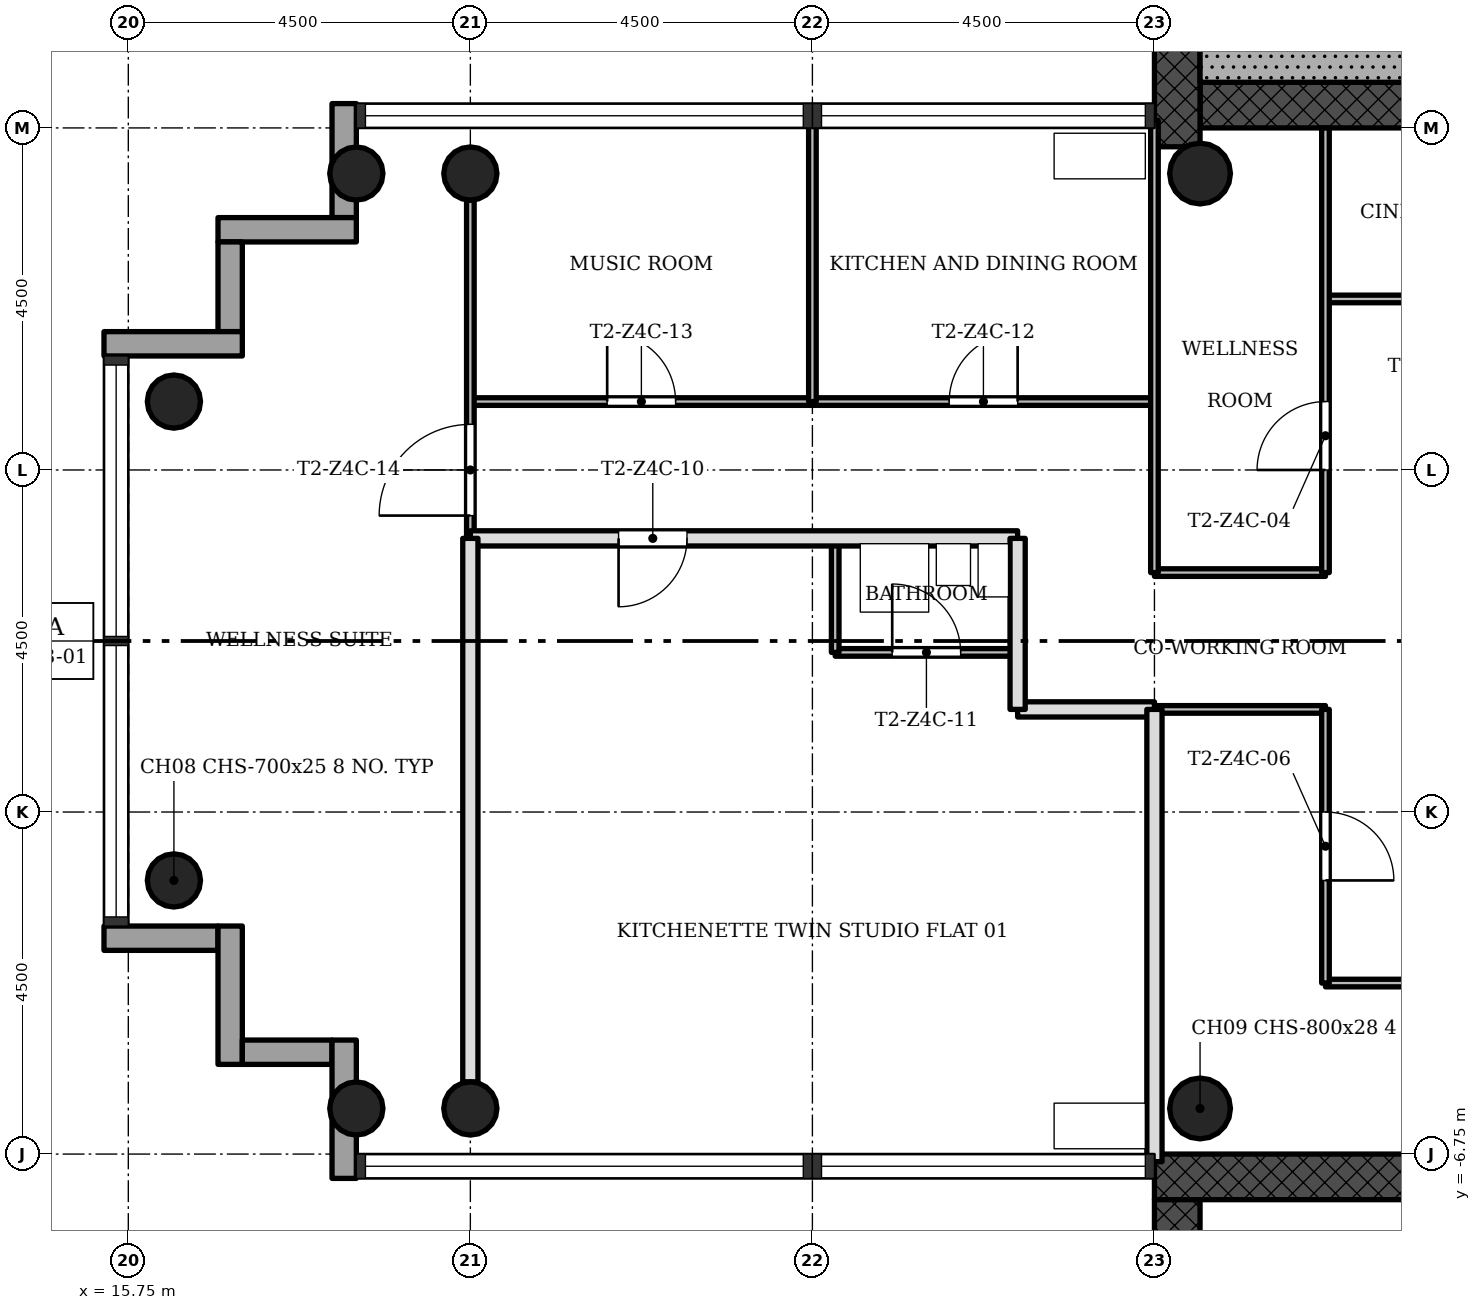
"""IFC4 building model, lengths in metres.
Left out: names, types, materials, properties, quantities, classifications, styles, units other than length and angle.
Written with IfcOpenShell. Run it as: python <this file> out.ifc"""

import sys

from ifc_helpers import new_model, si_unit, direction, frame, frame_2d, origin, origin_2d, place, context, subcontext, project, spatial, rectangle, hollow_circle, extrude, element, fill, save


model = new_model("IFC4")
c1 = context("Model", 3, precision=1e-05, world=origin(), true_north=direction((0.0, 1.0)))
c2 = subcontext(c1, "Body", "Model", "MODEL_VIEW")
j1 = project(units=[si_unit("LENGTHUNIT", "METRE"), si_unit("PLANEANGLEUNIT", "RADIAN")], contexts=[c1])
p1 = place(None, origin())
s1 = spatial("IfcSite", under=j1, at=p1, CompositionType="ELEMENT")
p2 = place(p1, origin())
s2 = spatial("IfcBuilding", under=s1, at=p2, CompositionType="ELEMENT")
p3 = place(p2, frame((0.0, 0.0, 192.6)))
s3 = spatial("IfcBuildingStorey", under=s2, at=p3, CompositionType="ELEMENT", Elevation=192.6)
p4 = place(p3, frame((29.85, 7.05, 0.0), z_axis=(0.0, 0.0, 1.0), x_axis=(1.0, 0.0, 0.0)))
e1 = element("IfcWall", 1, at=p4, inside=s3, PredefinedType="SHEAR", context=c2, shape_type="SweptSolid", body=[
    extrude(rectangle(XDim=12.9, YDim=0.6, at=frame_2d((6.45, 0.0))), origin(), (0.0, 0.0, 1.0), 3.4),
])
p5 = place(p4, frame((5.25, 0.0, 0.0)))
e2 = element("IfcOpeningElement", 2, at=p5, cuts=e1, PredefinedType="OPENING", context=c2, shape_type="SweptSolid", body=[
    extrude(rectangle(XDim=1.8, YDim=2.1, at=frame_2d((0.9, 1.05))), frame((0.0, 0.31, 0.0), z_axis=(0.0, -1.0, 0.0), x_axis=(1.0, 0.0, 0.0)), (0.0, 0.0, 1.0), 0.62),
])
p6 = place(p3, frame((29.55, 15.15, 0.0), z_axis=(0.0, 0.0, 1.0), x_axis=(0.0, -1.0, 0.0)))
e3 = element("IfcWall", 3, at=p6, inside=s3, PredefinedType="SHEAR", context=c2, shape_type="SweptSolid", body=[
    extrude(rectangle(XDim=8.648, YDim=0.6, at=frame_2d((4.324, 0.0))), origin(), (0.0, 0.0, 1.0), 3.4),
])
p7 = place(p3, frame((42.15, -7.05, 0.0), z_axis=(0.0, 0.0, 1.0), x_axis=(-1.0, 0.0, 0.0)))
e4 = element("IfcWall", 4, at=p7, inside=s3, PredefinedType="SHEAR", context=c2, shape_type="SweptSolid", body=[
    extrude(rectangle(XDim=12.9, YDim=0.6, at=frame_2d((6.45, 0.0))), origin(), (0.0, 0.0, 1.0), 3.4),
])
p8 = place(p7, frame((5.25, 0.0, 0.0)))
e5 = element("IfcOpeningElement", 5, at=p8, cuts=e4, PredefinedType="OPENING", context=c2, shape_type="SweptSolid", body=[
    extrude(rectangle(XDim=1.8, YDim=2.1, at=frame_2d((0.9, 1.05))), frame((0.0, 0.31, 0.0), z_axis=(0.0, -1.0, 0.0), x_axis=(1.0, 0.0, 0.0)), (0.0, 0.0, 1.0), 0.62),
])
p9 = place(p3, frame((29.55, -7.35, 0.0), z_axis=(0.0, 0.0, 1.0), x_axis=(0.0, -1.0, 0.0)))
e6 = element("IfcWall", 6, at=p9, inside=s3, PredefinedType="SHEAR", context=c2, shape_type="SweptSolid", body=[
    extrude(rectangle(XDim=8.4, YDim=0.6, at=frame_2d((4.2, 0.0))), origin(), (0.0, 0.0, 1.0), 3.4),
])
for number, where, z_axis, x_axis in (
    (7, (20.25, 6.15, 0.0), (0.0, 0.0, 1.0), (1.0, 0.0, 0.0)),
    (8, (20.25, -6.15, 0.0), (0.0, 0.0, 1.0), (1.0, 0.0, 0.0)),
    (9, (18.75, 6.15, 0.0), (0.0, 0.0, 1.0), (1.0, 0.0, 0.0)),
    (10, (18.75, -6.15, 0.0), (0.0, 0.0, 1.0), (1.0, 0.0, 0.0)),
    (11, (16.35, 3.15, 0.0), (0.0, 0.0, 1.0), (1.0, 0.0, 0.0)),
    (12, (16.35, -3.15, 0.0), (0.0, 0.0, 1.0), (1.0, 0.0, 0.0)),
):
    element("IfcColumn", number, at=place(p3, frame(where, z_axis=z_axis, x_axis=x_axis)), inside=s3, PredefinedType="COLUMN", context=c2, shape_type="SweptSolid", body=[
        extrude(hollow_circle(Radius=0.35, WallThickness=0.025, at=origin_2d()), origin(), (0.0, 0.0, 1.0), 3.4),
    ])
for number, where, z_axis, x_axis in (
    (13, (29.85, 6.15, 0.0), (0.0, 0.0, 1.0), (1.0, 0.0, 0.0)),
    (14, (29.85, -6.15, 0.0), (0.0, 0.0, 1.0), (1.0, 0.0, 0.0)),
):
    element("IfcColumn", number, at=place(p3, frame(where, z_axis=z_axis, x_axis=x_axis)), inside=s3, PredefinedType="COLUMN", context=c2, shape_type="SweptSolid", body=[
        extrude(hollow_circle(Radius=0.4, WallThickness=0.028, at=origin_2d()), origin(), (0.0, 0.0, 1.0), 3.4),
    ])
p10 = place(p3, frame((18.59, 7.07, -0.3), z_axis=(0.0, 0.0, 1.0), x_axis=(0.0, -1.0, 0.0)))
e15 = element("IfcWall", 15, at=p10, inside=s3, PredefinedType="STANDARD", context=c2, shape_type="SweptSolid", body=[
    extrude(rectangle(XDim=1.5, YDim=0.32, at=frame_2d((0.75, 0.0))), origin(), (0.0, 0.0, 1.0), 3.4),
])
p11 = place(p3, frame((18.75, 5.41, -0.3), z_axis=(0.0, 0.0, 1.0), x_axis=(-1.0, 0.0, 0.0)))
e16 = element("IfcWall", 16, at=p11, inside=s3, PredefinedType="STANDARD", context=c2, shape_type="SweptSolid", body=[
    extrude(rectangle(XDim=1.82, YDim=0.32, at=frame_2d((0.91, 0.0))), origin(), (0.0, 0.0, 1.0), 3.4),
])
p12 = place(p3, frame((17.09, 5.25, -0.3), z_axis=(0.0, 0.0, 1.0), x_axis=(0.0, -1.0, 0.0)))
e17 = element("IfcWall", 17, at=p12, inside=s3, PredefinedType="STANDARD", context=c2, shape_type="SweptSolid", body=[
    extrude(rectangle(XDim=1.18, YDim=0.32, at=frame_2d((0.59, 0.0))), origin(), (0.0, 0.0, 1.0), 3.4),
])
p13 = place(p3, frame((17.25, 3.91, -0.3), z_axis=(0.0, 0.0, 1.0), x_axis=(-1.0, 0.0, 0.0)))
e18 = element("IfcWall", 18, at=p13, inside=s3, PredefinedType="STANDARD", context=c2, shape_type="SweptSolid", body=[
    extrude(rectangle(XDim=1.82, YDim=0.32, at=frame_2d((0.91, 0.0))), origin(), (0.0, 0.0, 1.0), 3.4),
])
p14 = place(p3, frame((15.43, -3.91, -0.3), z_axis=(0.0, 0.0, 1.0), x_axis=(1.0, 0.0, 0.0)))
e19 = element("IfcWall", 19, at=p14, inside=s3, PredefinedType="STANDARD", context=c2, shape_type="SweptSolid", body=[
    extrude(rectangle(XDim=1.5, YDim=0.32, at=frame_2d((0.75, 0.0))), origin(), (0.0, 0.0, 1.0), 3.4),
])
p15 = place(p3, frame((17.09, -3.75, -0.3), z_axis=(0.0, 0.0, 1.0), x_axis=(0.0, -1.0, 0.0)))
e20 = element("IfcWall", 20, at=p15, inside=s3, PredefinedType="STANDARD", context=c2, shape_type="SweptSolid", body=[
    extrude(rectangle(XDim=1.82, YDim=0.32, at=frame_2d((0.91, 0.0))), origin(), (0.0, 0.0, 1.0), 3.4),
])
p16 = place(p3, frame((17.25, -5.41, -0.3), z_axis=(0.0, 0.0, 1.0), x_axis=(1.0, 0.0, 0.0)))
e21 = element("IfcWall", 21, at=p16, inside=s3, PredefinedType="STANDARD", context=c2, shape_type="SweptSolid", body=[
    extrude(rectangle(XDim=1.18, YDim=0.32, at=frame_2d((0.59, 0.0))), origin(), (0.0, 0.0, 1.0), 3.4),
])
p17 = place(p3, frame((18.59, -5.25, -0.3), z_axis=(0.0, 0.0, 1.0), x_axis=(0.0, -1.0, 0.0)))
e22 = element("IfcWall", 22, at=p17, inside=s3, PredefinedType="STANDARD", context=c2, shape_type="SweptSolid", body=[
    extrude(rectangle(XDim=1.82, YDim=0.32, at=frame_2d((0.91, 0.0))), origin(), (0.0, 0.0, 1.0), 3.4),
])
p18 = place(p3, frame((34.5, -4.5, 0.0), z_axis=(0.0, 0.0, 1.0), x_axis=(-1.0, 0.0, 0.0)))
e23 = element("IfcWall", 23, at=p18, inside=s3, PredefinedType="PARTITIONING", context=c2, shape_type="SweptSolid", body=[
    extrude(rectangle(XDim=3.0, YDim=0.1, at=frame_2d((1.5, 0.0))), origin(), (0.0, 0.0, 1.0), 3.0),
])
p19 = place(p3, frame((31.5, -0.9, 0.0), z_axis=(0.0, 0.0, 1.0), x_axis=(-1.0, 0.0, 0.0)))
e24 = element("IfcWall", 24, at=p19, inside=s3, PredefinedType="PARTITIONING", context=c2, shape_type="SweptSolid", body=[
    extrude(rectangle(XDim=2.25, YDim=0.1, at=frame_2d((1.125, 0.0))), origin(), (0.0, 0.0, 1.0), 3.0),
])
p20 = place(p3, frame((29.25, -0.9, 0.0), z_axis=(0.0, 0.0, 1.0), x_axis=(-1.0, 0.0, 0.0)))
e25 = element("IfcWall", 25, at=p20, inside=s3, PredefinedType="SOLIDWALL", context=c2, shape_type="SweptSolid", body=[
    extrude(rectangle(XDim=1.8, YDim=0.2, at=frame_2d((0.9, 0.0))), origin(), (0.0, 0.0, 1.0), 3.0),
])
p21 = place(p3, frame((27.45, -0.15, 0.0), z_axis=(0.0, 0.0, 1.0), x_axis=(-1.0, 0.0, 0.0)))
e26 = element("IfcWall", 26, at=p21, inside=s3, PredefinedType="PARTITIONING", context=c2, shape_type="SweptSolid", body=[
    extrude(rectangle(XDim=2.4, YDim=0.1, at=frame_2d((1.2, 0.0))), origin(), (0.0, 0.0, 1.0), 3.0),
])
p22 = place(p21, frame((0.75, 0.0, 0.0)))
e27 = element("IfcOpeningElement", 27, at=p22, cuts=e26, PredefinedType="OPENING", context=c2, shape_type="SweptSolid", body=[
    extrude(rectangle(XDim=0.9, YDim=2.1, at=frame_2d((0.45, 1.05))), frame((0.0, 0.06, 0.0), z_axis=(0.0, -1.0, 0.0), x_axis=(1.0, 0.0, 0.0)), (0.0, 0.0, 1.0), 0.12),
])
p23 = place(p3, frame((31.5, 0.9, 0.0), z_axis=(0.0, 0.0, 1.0), x_axis=(-1.0, 0.0, 0.0)))
e28 = element("IfcWall", 28, at=p23, inside=s3, PredefinedType="PARTITIONING", context=c2, shape_type="SweptSolid", body=[
    extrude(rectangle(XDim=2.25, YDim=0.1, at=frame_2d((1.125, 0.0))), origin(), (0.0, 0.0, 1.0), 3.0),
])
p24 = place(p3, frame((27.45, 1.35, 0.0), z_axis=(0.0, 0.0, 1.0), x_axis=(-1.0, 0.0, 0.0)))
e29 = element("IfcWall", 29, at=p24, inside=s3, PredefinedType="SOLIDWALL", context=c2, shape_type="SweptSolid", body=[
    extrude(rectangle(XDim=7.2, YDim=0.2, at=frame_2d((3.6, 0.0))), origin(), (0.0, 0.0, 1.0), 3.0),
])
p25 = place(p24, frame((4.35, 0.0, 0.0)))
e30 = element("IfcOpeningElement", 30, at=p25, cuts=e29, PredefinedType="OPENING", context=c2, shape_type="SweptSolid", body=[
    extrude(rectangle(XDim=0.9, YDim=2.1, at=frame_2d((0.45, 1.05))), frame((0.0, 0.11, 0.0), z_axis=(0.0, -1.0, 0.0), x_axis=(1.0, 0.0, 0.0)), (0.0, 0.0, 1.0), 0.22),
])
p26 = place(p3, frame((29.25, 3.15, 0.0), z_axis=(0.0, 0.0, 1.0), x_axis=(-1.0, 0.0, 0.0)))
e31 = element("IfcWall", 31, at=p26, inside=s3, PredefinedType="PARTITIONING", context=c2, shape_type="SweptSolid", body=[
    extrude(rectangle(XDim=9.0, YDim=0.1, at=frame_2d((4.5, 0.0))), origin(), (0.0, 0.0, 1.0), 3.0),
])
p27 = place(p26, frame((1.8, 0.0, 0.0)))
e32 = element("IfcOpeningElement", 32, at=p27, cuts=e31, PredefinedType="OPENING", context=c2, shape_type="SweptSolid", body=[
    extrude(rectangle(XDim=0.9, YDim=2.1, at=frame_2d((0.45, 1.05))), frame((0.0, 0.06, 0.0), z_axis=(0.0, -1.0, 0.0), x_axis=(1.0, 0.0, 0.0)), (0.0, 0.0, 1.0), 0.12),
])
p28 = place(p26, frame((6.3, 0.0, 0.0)))
e33 = element("IfcOpeningElement", 33, at=p28, cuts=e31, PredefinedType="OPENING", context=c2, shape_type="SweptSolid", body=[
    extrude(rectangle(XDim=0.9, YDim=2.1, at=frame_2d((0.45, 1.05))), frame((0.0, 0.06, 0.0), z_axis=(0.0, -1.0, 0.0), x_axis=(1.0, 0.0, 0.0)), (0.0, 0.0, 1.0), 0.12),
])
p29 = place(p3, frame((34.5, 4.5, 0.0), z_axis=(0.0, 0.0, 1.0), x_axis=(-1.0, 0.0, 0.0)))
e34 = element("IfcWall", 34, at=p29, inside=s3, PredefinedType="PARTITIONING", context=c2, shape_type="SweptSolid", body=[
    extrude(rectangle(XDim=3.0, YDim=0.1, at=frame_2d((1.5, 0.0))), origin(), (0.0, 0.0, 1.0), 3.0),
])
p30 = place(p29, frame((1.05, 0.0, 0.0)))
e35 = element("IfcOpeningElement", 35, at=p30, cuts=e34, PredefinedType="OPENING", context=c2, shape_type="SweptSolid", body=[
    extrude(rectangle(XDim=0.9, YDim=2.1, at=frame_2d((0.45, 1.05))), frame((0.0, 0.06, 0.0), z_axis=(0.0, -1.0, 0.0), x_axis=(1.0, 0.0, 0.0)), (0.0, 0.0, 1.0), 0.12),
])
p31 = place(p3, frame((31.5, -4.5, 0.0), z_axis=(0.0, 0.0, 1.0), x_axis=(0.0, 1.0, 0.0)))
e36 = element("IfcWall", 36, at=p31, inside=s3, PredefinedType="PARTITIONING", context=c2, shape_type="SweptSolid", body=[
    extrude(rectangle(XDim=3.6, YDim=0.1, at=frame_2d((1.8, 0.0))), origin(), (0.0, 0.0, 1.0), 3.0),
])
p32 = place(p31, frame((1.35, 0.0, 0.0)))
e37 = element("IfcOpeningElement", 37, at=p32, cuts=e36, PredefinedType="OPENING", context=c2, shape_type="SweptSolid", body=[
    extrude(rectangle(XDim=0.9, YDim=2.1, at=frame_2d((0.45, 1.05))), frame((0.0, 0.06, 0.0), z_axis=(0.0, -1.0, 0.0), x_axis=(1.0, 0.0, 0.0)), (0.0, 0.0, 1.0), 0.12),
])
p33 = place(p3, frame((31.5, 0.9, 0.0), z_axis=(0.0, 0.0, 1.0), x_axis=(0.0, 1.0, 0.0)))
e38 = element("IfcWall", 38, at=p33, inside=s3, PredefinedType="PARTITIONING", context=c2, shape_type="SweptSolid", body=[
    extrude(rectangle(XDim=5.85, YDim=0.1, at=frame_2d((2.925, 0.0))), origin(), (0.0, 0.0, 1.0), 3.0),
])
p34 = place(p33, frame((1.35, 0.0, 0.0)))
e39 = element("IfcOpeningElement", 39, at=p34, cuts=e38, PredefinedType="OPENING", context=c2, shape_type="SweptSolid", body=[
    extrude(rectangle(XDim=0.9, YDim=2.1, at=frame_2d((0.45, 1.05))), frame((0.0, 0.06, 0.0), z_axis=(0.0, -1.0, 0.0), x_axis=(1.0, 0.0, 0.0)), (0.0, 0.0, 1.0), 0.12),
])
p35 = place(p3, frame((29.25, 0.9, 0.0), z_axis=(0.0, 0.0, 1.0), x_axis=(0.0, 1.0, 0.0)))
e40 = element("IfcWall", 40, at=p35, inside=s3, PredefinedType="PARTITIONING", context=c2, shape_type="SweptSolid", body=[
    extrude(rectangle(XDim=5.95, YDim=0.1, at=frame_2d((2.975, 0.0))), origin(), (0.0, 0.0, 1.0), 3.0),
])
p36 = place(p3, frame((29.25, -6.85, 0.0), z_axis=(0.0, 0.0, 1.0), x_axis=(0.0, 1.0, 0.0)))
e41 = element("IfcWall", 41, at=p36, inside=s3, PredefinedType="SOLIDWALL", context=c2, shape_type="SweptSolid", body=[
    extrude(rectangle(XDim=5.95, YDim=0.2, at=frame_2d((2.975, 0.0))), origin(), (0.0, 0.0, 1.0), 3.0),
])
p37 = place(p3, frame((27.45, -0.9, 0.0), z_axis=(0.0, 0.0, 1.0), x_axis=(0.0, 1.0, 0.0)))
e42 = element("IfcWall", 42, at=p37, inside=s3, PredefinedType="SOLIDWALL", context=c2, shape_type="SweptSolid", body=[
    extrude(rectangle(XDim=2.25, YDim=0.2, at=frame_2d((1.125, 0.0))), origin(), (0.0, 0.0, 1.0), 3.0),
])
p38 = place(p3, frame((25.05, -0.15, 0.0), z_axis=(0.0, 0.0, 1.0), x_axis=(0.0, 1.0, 0.0)))
e43 = element("IfcWall", 43, at=p38, inside=s3, PredefinedType="PARTITIONING", context=c2, shape_type="SweptSolid", body=[
    extrude(rectangle(XDim=1.5, YDim=0.1, at=frame_2d((0.75, 0.0))), origin(), (0.0, 0.0, 1.0), 3.0),
])
p39 = place(p3, frame((24.75, 3.15, 0.0), z_axis=(0.0, 0.0, 1.0), x_axis=(0.0, 1.0, 0.0)))
e44 = element("IfcWall", 44, at=p39, inside=s3, PredefinedType="PARTITIONING", context=c2, shape_type="SweptSolid", body=[
    extrude(rectangle(XDim=3.7, YDim=0.1, at=frame_2d((1.85, 0.0))), origin(), (0.0, 0.0, 1.0), 3.0),
])
p40 = place(p3, frame((20.25, 1.35, 0.0), z_axis=(0.0, 0.0, 1.0), x_axis=(0.0, 1.0, 0.0)))
e45 = element("IfcWall", 45, at=p40, inside=s3, PredefinedType="PARTITIONING", context=c2, shape_type="SweptSolid", body=[
    extrude(rectangle(XDim=4.45, YDim=0.1, at=frame_2d((2.225, 0.0))), origin(), (0.0, 0.0, 1.0), 3.0),
])
p41 = place(p40, frame((0.3, 0.0, 0.0)))
e46 = element("IfcOpeningElement", 46, at=p41, cuts=e45, PredefinedType="OPENING", context=c2, shape_type="SweptSolid", body=[
    extrude(rectangle(XDim=1.2, YDim=2.1, at=frame_2d((0.6, 1.05))), frame((0.0, 0.06, 0.0), z_axis=(0.0, -1.0, 0.0), x_axis=(1.0, 0.0, 0.0)), (0.0, 0.0, 1.0), 0.12),
])
p42 = place(p3, frame((20.25, -5.8, 0.0), z_axis=(0.0, 0.0, 1.0), x_axis=(0.0, 1.0, 0.0)))
e47 = element("IfcWall", 47, at=p42, inside=s3, PredefinedType="SOLIDWALL", context=c2, shape_type="SweptSolid", body=[
    extrude(rectangle(XDim=7.15, YDim=0.2, at=frame_2d((3.575, 0.0))), origin(), (0.0, 0.0, 1.0), 3.0),
])
p43 = place(p3, frame((34.15, 7.65, 0.0), z_axis=(0.0, 0.0, 1.0), x_axis=(-1.0, 0.0, 0.0)))
e48 = element("IfcWall", 48, at=p43, inside=s3, PredefinedType="SHEAR", context=c2, shape_type="SweptSolid", body=[
    extrude(rectangle(XDim=4.3, YDim=0.6, at=frame_2d((2.15, 0.0))), origin(), (0.0, 0.0, 1.0), 3.4),
])
p44 = place(p34, origin())
e49 = element("IfcDoor", 49, at=p44, inside=s3, OperationType="SINGLE_SWING_RIGHT", PredefinedType="DOOR", context=c2, shape_type="SweptSolid", body=[
    extrude(rectangle(XDim=0.9, YDim=2.1, at=frame_2d((0.45, 1.05))), frame((0.0, 0.025, 0.0), z_axis=(0.0, -1.0, 0.0), x_axis=(1.0, 0.0, 0.0)), (0.0, 0.0, 1.0), 0.05),
])
fill(e39, e49)
p45 = place(p32, origin())
e50 = element("IfcDoor", 50, at=p45, inside=s3, OperationType="SINGLE_SWING_LEFT", PredefinedType="DOOR", context=c2, shape_type="SweptSolid", body=[
    extrude(rectangle(XDim=0.9, YDim=2.1, at=frame_2d((0.45, 1.05))), frame((0.0, 0.025, 0.0), z_axis=(0.0, -1.0, 0.0), x_axis=(1.0, 0.0, 0.0)), (0.0, 0.0, 1.0), 0.05),
])
fill(e37, e50)
p46 = place(p25, origin())
e51 = element("IfcDoor", 51, at=p46, inside=s3, OperationType="SINGLE_SWING_LEFT", PredefinedType="DOOR", context=c2, shape_type="SweptSolid", body=[
    extrude(rectangle(XDim=0.9, YDim=2.1, at=frame_2d((0.45, 1.05))), frame((0.0, 0.025, 0.0), z_axis=(0.0, -1.0, 0.0), x_axis=(1.0, 0.0, 0.0)), (0.0, 0.0, 1.0), 0.05),
])
fill(e30, e51)
p47 = place(p22, origin())
e52 = element("IfcDoor", 52, at=p47, inside=s3, OperationType="SINGLE_SWING_RIGHT", PredefinedType="DOOR", context=c2, shape_type="SweptSolid", body=[
    extrude(rectangle(XDim=0.9, YDim=2.1, at=frame_2d((0.45, 1.05))), frame((0.0, 0.025, 0.0), z_axis=(0.0, -1.0, 0.0), x_axis=(1.0, 0.0, 0.0)), (0.0, 0.0, 1.0), 0.05),
])
fill(e27, e52)
p48 = place(p27, origin())
e53 = element("IfcDoor", 53, at=p48, inside=s3, OperationType="SINGLE_SWING_LEFT", PredefinedType="DOOR", context=c2, shape_type="SweptSolid", body=[
    extrude(rectangle(XDim=0.9, YDim=2.1, at=frame_2d((0.45, 1.05))), frame((0.0, 0.025, 0.0), z_axis=(0.0, -1.0, 0.0), x_axis=(1.0, 0.0, 0.0)), (0.0, 0.0, 1.0), 0.05),
])
fill(e32, e53)
p49 = place(p28, origin())
e54 = element("IfcDoor", 54, at=p49, inside=s3, OperationType="SINGLE_SWING_RIGHT", PredefinedType="DOOR", context=c2, shape_type="SweptSolid", body=[
    extrude(rectangle(XDim=0.9, YDim=2.1, at=frame_2d((0.45, 1.05))), frame((0.0, 0.025, 0.0), z_axis=(0.0, -1.0, 0.0), x_axis=(1.0, 0.0, 0.0)), (0.0, 0.0, 1.0), 0.05),
])
fill(e33, e54)
p50 = place(p41, origin())
e55 = element("IfcDoor", 55, at=p50, inside=s3, OperationType="SINGLE_SWING_RIGHT", PredefinedType="DOOR", context=c2, shape_type="SweptSolid", body=[
    extrude(rectangle(XDim=1.2, YDim=2.1, at=frame_2d((0.6, 1.05))), frame((0.0, 0.025, 0.0), z_axis=(0.0, -1.0, 0.0), x_axis=(1.0, 0.0, 0.0)), (0.0, 0.0, 1.0), 0.05),
])
fill(e46, e55)
save(model, sys.argv[1])
